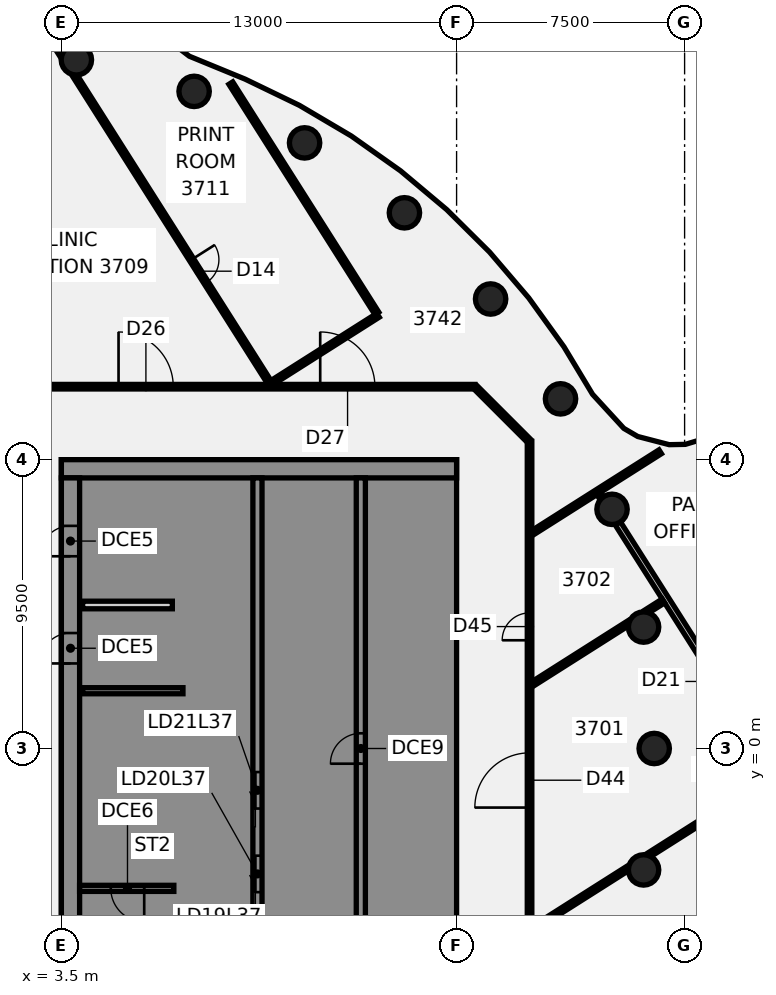
"""IFC4 building model, lengths in metres.
Left out: names, types, materials, properties, quantities, classifications, styles, units other than length and angle.
Written with IfcOpenShell. Run it as: python <this file> out.ifc"""

import sys

from ifc_helpers import new_model, si_unit, direction, frame, frame_2d, origin, origin_2d, place, context, subcontext, project, spatial, polyline, rectangle, circle, outline, extrude, element, fill, save


model = new_model("IFC4")
c1 = context("Model", 3, precision=1e-05, world=origin(), true_north=direction((0.0, 1.0)))
c2 = subcontext(c1, "Body", "Model", "MODEL_VIEW")
j1 = project(units=[si_unit("LENGTHUNIT", "METRE"), si_unit("PLANEANGLEUNIT", "RADIAN")], contexts=[c1])
p1 = place(None, origin())
s1 = spatial("IfcSite", under=j1, at=p1, CompositionType="ELEMENT")
p2 = place(p1, origin())
s2 = spatial("IfcBuilding", under=s1, at=p2, CompositionType="ELEMENT")
p3 = place(p2, frame((0.0, 0.0, 151.75)))
s3 = spatial("IfcBuildingStorey", under=s2, at=p3, CompositionType="ELEMENT", Elevation=151.75)
for number, where, z_axis, x_axis in (
    (1, (23.0, 0.0, -0.14), (0.0, 0.0, 1.0), (1.0, 0.0, 0.0)),
    (2, (22.651, 3.994, -0.14), (0.0, 0.0, 1.0), (1.0, 0.0, 0.0)),
    (3, (21.613, 7.866, -0.14), (0.0, 0.0, 1.0), (1.0, 0.0, 0.0)),
    (4, (19.919, 11.5, -0.14), (0.0, 0.0, 1.0), (1.0, 0.0, 0.0)),
    (5, (17.619, 14.784, -0.14), (0.0, 0.0, 1.0), (1.0, 0.0, 0.0)),
    (6, (14.784, 17.619, -0.14), (0.0, 0.0, 1.0), (1.0, 0.0, 0.0)),
    (7, (11.5, 19.919, -0.14), (0.0, 0.0, 1.0), (1.0, 0.0, 0.0)),
    (8, (7.866, 21.613, -0.14), (0.0, 0.0, 1.0), (1.0, 0.0, 0.0)),
    (9, (3.994, 22.651, -0.14), (0.0, 0.0, 1.0), (1.0, 0.0, 0.0)),
    (10, (22.651, -3.994, -0.14), (0.0, 0.0, 1.0), (1.0, 0.0, 0.0)),
):
    element("IfcColumn", number, at=place(p3, frame(where, z_axis=z_axis, x_axis=x_axis)), inside=s3, PredefinedType="COLUMN", context=c2, shape_type="SweptSolid", body=[
        extrude(circle(Radius=0.5, at=origin_2d()), origin(), (0.0, 0.0, 1.0), 3.75),
    ])
p4 = place(p3, frame((0.89, 26.946, 0.0), z_axis=(0.0, 0.0, 1.0), x_axis=(0.535621508911, -0.844458169001, 0.0)))
e11 = element("IfcWall", 11, at=p4, inside=s3, PredefinedType="PARTITIONING", context=c2, shape_type="SweptSolid", body=[
    extrude(rectangle(XDim=4.916, YDim=0.15, at=frame_2d((2.458, 0.0))), origin(), (0.0, 0.0, 1.0), 3.01),
])
p5 = place(p3, frame((3.926, 22.159, 0.0), z_axis=(0.0, 0.0, 1.0), x_axis=(0.53563370317, -0.844450434323, 0.0)))
e12 = element("IfcWall", 12, at=p5, inside=s3, PredefinedType="PARTITIONING", context=c2, shape_type="SweptSolid", body=[
    extrude(rectangle(XDim=11.951, YDim=0.15, at=frame_2d((5.976, 0.0))), origin(), (0.0, 0.0, 1.0), 3.01),
])
p6 = place(p5, frame((7.2, 0.0, 0.0)))
e13 = element("IfcOpeningElement", 13, at=p6, cuts=e12, PredefinedType="OPENING", context=c2, shape_type="SweptSolid", body=[
    extrude(rectangle(XDim=0.9, YDim=2.1, at=frame_2d((0.45, 1.05))), frame((0.0, 0.085, 0.0), z_axis=(0.0, -1.0, 0.0), x_axis=(1.0, 0.0, 0.0)), (0.0, 0.0, 1.0), 0.17),
])
p7 = place(p3, frame((9.073, 21.885, 0.0), z_axis=(0.0, 0.0, 1.0), x_axis=(0.535664679525, -0.844430785268, 0.0)))
e14 = element("IfcWall", 14, at=p7, inside=s3, PredefinedType="PARTITIONING", context=c2, shape_type="SweptSolid", body=[
    extrude(rectangle(XDim=8.967, YDim=0.15, at=frame_2d((4.484, 0.0))), origin(), (0.0, 0.0, 1.0), 3.01),
])
p8 = place(p3, frame((21.178, 8.39, 0.0), z_axis=(0.0, 0.0, 1.0), x_axis=(0.535205480582, -0.844721903087, 0.0)))
e15 = element("IfcWall", 15, at=p8, inside=s3, PredefinedType="PARTITIONING", context=c2, shape_type="SweptSolid", body=[
    extrude(rectangle(XDim=0.189, YDim=0.15, at=frame_2d((0.095, 0.0))), origin(), (0.0, 0.0, 1.0), 3.01),
])
p9 = place(p3, frame((21.802, 7.407, 0.0), z_axis=(0.0, 0.0, 1.0), x_axis=(0.535767031035, -0.844365849888, 0.0)))
e16 = element("IfcWall", 16, at=p9, inside=s3, PredefinedType="PARTITIONING", context=c2, shape_type="SweptSolid", body=[
    extrude(rectangle(XDim=13.06, YDim=0.2, at=frame_2d((6.53, 0.0))), origin(), (0.0, 0.0, 1.0), 3.01),
])
p10 = place(p9, frame((5.461, 0.0, 0.0)))
e17 = element("IfcOpeningElement", 17, at=p10, cuts=e16, PredefinedType="OPENING", context=c2, shape_type="SweptSolid", body=[
    extrude(rectangle(XDim=1.4, YDim=2.1, at=frame_2d((0.7, 1.05))), frame((0.0, 0.11, 0.0), z_axis=(0.0, -1.0, 0.0), x_axis=(1.0, 0.0, 0.0)), (0.0, 0.0, 1.0), 0.22),
])
p11 = place(p3, frame((17.128, 11.872, 0.0), z_axis=(0.0, 0.0, 1.0), x_axis=(0.707106781187, -0.707106781187, 0.0)))
e18 = element("IfcWall", 18, at=p11, inside=s3, PredefinedType="PARTITIONING", context=c2, shape_type="SweptSolid", body=[
    extrude(rectangle(XDim=2.465, YDim=0.15, at=frame_2d((1.232, 0.0))), origin(), (0.0, 0.0, 1.0), 3.01),
])
p12 = place(p3, frame((-17.065, 11.9, 0.0), z_axis=(0.0, 0.0, 1.0), x_axis=(1.0, 0.0, 0.0)))
e19 = element("IfcWall", 19, at=p12, inside=s3, PredefinedType="PARTITIONING", context=c2, shape_type="SweptSolid", body=[
    extrude(rectangle(XDim=34.165, YDim=0.15, at=frame_2d((17.083, 0.0))), origin(), (0.0, 0.0, 1.0), 3.01),
])
p13 = place(p12, frame((22.446, 0.0, 0.0)))
e20 = element("IfcOpeningElement", 20, at=p13, cuts=e19, PredefinedType="OPENING", context=c2, shape_type="SweptSolid", body=[
    extrude(rectangle(XDim=1.8, YDim=2.1, at=frame_2d((0.9, 1.05))), frame((0.0, 0.085, 0.0), z_axis=(0.0, -1.0, 0.0), x_axis=(1.0, 0.0, 0.0)), (0.0, 0.0, 1.0), 0.17),
])
p14 = place(p12, frame((29.079, 0.0, 0.0)))
e21 = element("IfcOpeningElement", 21, at=p14, cuts=e19, PredefinedType="OPENING", context=c2, shape_type="SweptSolid", body=[
    extrude(rectangle(XDim=1.8, YDim=2.1, at=frame_2d((0.9, 1.05))), frame((0.0, 0.085, 0.0), z_axis=(0.0, -1.0, 0.0), x_axis=(1.0, 0.0, 0.0)), (0.0, 0.0, 1.0), 0.17),
])
p15 = place(p12, frame((8.445, 0.0, 0.0)))
e22 = element("IfcOpeningElement", 22, at=p15, cuts=e19, PredefinedType="OPENING", context=c2, shape_type="SweptSolid", body=[
    extrude(rectangle(XDim=1.8, YDim=2.1, at=frame_2d((0.9, 1.05))), frame((0.0, 0.085, 0.0), z_axis=(0.0, -1.0, 0.0), x_axis=(1.0, 0.0, 0.0)), (0.0, 0.0, 1.0), 0.17),
])
p16 = place(p3, frame((-7.407, 21.802, 0.0), z_axis=(0.0, 0.0, 1.0), x_axis=(0.844365849888, 0.535767031035, 0.0)))
e23 = element("IfcWall", 23, at=p16, inside=s3, PredefinedType="PARTITIONING", context=c2, shape_type="SweptSolid", body=[
    extrude(rectangle(XDim=13.06, YDim=0.2, at=frame_2d((6.53, 0.0))), origin(), (0.0, 0.0, 1.0), 3.01),
])
p17 = place(p16, frame((5.461, 0.0, 0.0)))
e24 = element("IfcOpeningElement", 24, at=p17, cuts=e23, PredefinedType="OPENING", context=c2, shape_type="SweptSolid", body=[
    extrude(rectangle(XDim=1.4, YDim=2.1, at=frame_2d((0.7, 1.05))), frame((0.0, 0.11, 0.0), z_axis=(0.0, -1.0, 0.0), x_axis=(1.0, 0.0, 0.0)), (0.0, 0.0, 1.0), 0.22),
])
p18 = place(p16, frame((8.461, 0.0, 0.0)))
e25 = element("IfcOpeningElement", 25, at=p18, cuts=e23, PredefinedType="OPENING", context=c2, shape_type="SweptSolid", body=[
    extrude(rectangle(XDim=0.9, YDim=2.1, at=frame_2d((0.45, 1.05))), frame((0.0, 0.11, 0.0), z_axis=(0.0, -1.0, 0.0), x_axis=(1.0, 0.0, 0.0)), (0.0, 0.0, 1.0), 0.22),
])
p19 = place(p3, frame((10.404, 12.021, 0.0), z_axis=(0.0, 0.0, 1.0), x_axis=(0.844421821782, 0.535678809454, 0.0)))
e26 = element("IfcWall", 26, at=p19, inside=s3, PredefinedType="PARTITIONING", context=c2, shape_type="SweptSolid", body=[
    extrude(rectangle(XDim=4.16, YDim=0.15, at=frame_2d((2.08, 0.0))), origin(), (0.0, 0.0, 1.0), 3.01),
])
p20 = place(p3, frame((18.997, -5.931, 0.0), z_axis=(0.0, 0.0, 1.0), x_axis=(0.844425849741, 0.535672459894, 0.0)))
e27 = element("IfcWall", 27, at=p20, inside=s3, PredefinedType="PARTITIONING", context=c2, shape_type="SweptSolid", body=[
    extrude(rectangle(XDim=3.744, YDim=0.15, at=frame_2d((1.872, 0.0))), origin(), (0.0, 0.0, 1.0), 3.01),
])
p21 = place(p3, frame((22.795, -3.522, 0.0), z_axis=(0.0, 0.0, 1.0), x_axis=(0.844458169001, 0.535621508911, 0.0)))
e28 = element("IfcWall", 28, at=p21, inside=s3, PredefinedType="PARTITIONING", context=c2, shape_type="SweptSolid", body=[
    extrude(rectangle(XDim=4.916, YDim=0.15, at=frame_2d((2.458, 0.0))), origin(), (0.0, 0.0, 1.0), 3.01),
])
p22 = place(p21, frame((2.7, 0.0, 0.0)))
e29 = element("IfcOpeningElement", 29, at=p22, cuts=e28, PredefinedType="OPENING", context=c2, shape_type="SweptSolid", body=[
    extrude(rectangle(XDim=0.9, YDim=2.1, at=frame_2d((0.45, 1.05))), frame((0.0, 0.085, 0.0), z_axis=(0.0, -1.0, 0.0), x_axis=(1.0, 0.0, 0.0)), (0.0, 0.0, 1.0), 0.17),
])
p23 = place(p3, frame((18.997, 2.122, 0.0), z_axis=(0.0, 0.0, 1.0), x_axis=(0.844431403995, 0.535663704153, 0.0)))
e30 = element("IfcWall", 30, at=p23, inside=s3, PredefinedType="PARTITIONING", context=c2, shape_type="SweptSolid", body=[
    extrude(rectangle(XDim=3.769, YDim=0.15, at=frame_2d((1.885, 0.0))), origin(), (0.0, 0.0, 1.0), 3.01),
])
p24 = place(p3, frame((22.722, 4.485, 0.0), z_axis=(0.0, 0.0, 1.0), x_axis=(0.844332505382, 0.535819578174, 0.0)))
e31 = element("IfcWall", 31, at=p24, inside=s3, PredefinedType="PARTITIONING", context=c2, shape_type="SweptSolid", body=[
    extrude(rectangle(XDim=0.688, YDim=0.15, at=frame_2d((0.344, 0.0))), origin(), (0.0, 0.0, 1.0), 3.01),
])
p25 = place(p3, frame((18.997, 7.096, 0.0), z_axis=(0.0, 0.0, 1.0), x_axis=(0.844555681742, 0.535467739866, 0.0)))
e32 = element("IfcWall", 32, at=p25, inside=s3, PredefinedType="PARTITIONING", context=c2, shape_type="SweptSolid", body=[
    extrude(rectangle(XDim=4.974, YDim=0.15, at=frame_2d((2.487, 0.0))), origin(), (0.0, 0.0, 1.0), 3.01),
])
p26 = place(p3, frame((18.9, -10.1, 0.0), z_axis=(0.0, 0.0, 1.0), x_axis=(0.0, 1.0, 0.0)))
e33 = element("IfcWall", 33, at=p26, inside=s3, PredefinedType="PARTITIONING", context=c2, shape_type="SweptSolid", body=[
    extrude(rectangle(XDim=20.2, YDim=0.15, at=frame_2d((10.1, 0.0))), origin(), (0.0, 0.0, 1.0), 3.01),
])
p27 = place(p26, frame((8.157, 0.0, 0.0)))
e34 = element("IfcOpeningElement", 34, at=p27, cuts=e33, PredefinedType="OPENING", context=c2, shape_type="SweptSolid", body=[
    extrude(rectangle(XDim=1.8, YDim=2.1, at=frame_2d((0.9, 1.05))), frame((0.0, 0.085, 0.0), z_axis=(0.0, -1.0, 0.0), x_axis=(1.0, 0.0, 0.0)), (0.0, 0.0, 1.0), 0.17),
])
p28 = place(p26, frame((13.66, 0.0, 0.0)))
e35 = element("IfcOpeningElement", 35, at=p28, cuts=e33, PredefinedType="OPENING", context=c2, shape_type="SweptSolid", body=[
    extrude(rectangle(XDim=0.9, YDim=2.1, at=frame_2d((0.45, 1.05))), frame((0.0, 0.085, 0.0), z_axis=(0.0, -1.0, 0.0), x_axis=(1.0, 0.0, 0.0)), (0.0, 0.0, 1.0), 0.17),
])
p29 = place(p3, origin())
e36 = element("IfcWall", 36, at=p29, inside=s3, PredefinedType="SHEAR", context=c2, shape_type="SweptSolid", body=[
    extrude(outline(polyline([(13.5, -8.125), (13.5, -8.9), (15.9, -8.9), (16.5, -8.9), (16.5, 8.9), (15.9, 8.9), (13.5, 8.9), (13.5, 8.125), (15.9, 8.125), (15.9, 5.625), (13.5, 5.625), (13.5, 5.375), (15.9, 5.375), (15.9, -5.375), (13.5, -5.375), (13.5, -5.625), (15.9, -5.625), (15.9, -8.125), (13.5, -8.125)])), origin(), (0.0, 0.0, 1.0), 3.61),
])
p30 = place(p3, frame((16.5, 9.2, 0.0), z_axis=(0.0, 0.0, 1.0), x_axis=(-1.0, 0.0, 0.0)))
e37 = element("IfcWall", 37, at=p30, inside=s3, PredefinedType="SHEAR", context=c2, shape_type="SweptSolid", body=[
    extrude(rectangle(XDim=13.0, YDim=0.6, at=frame_2d((6.5, 0.0))), origin(), (0.0, 0.0, 1.0), 3.61),
])
p31 = place(p3, origin())
e38 = element("IfcWall", 38, at=p31, inside=s3, PredefinedType="SHEAR", context=c2, shape_type="SweptSolid", body=[
    extrude(outline(polyline([(9.8, -5.375), (7.5, -5.375), (7.5, -2.875), (9.8, -2.875), (9.8, -2.625), (7.5, -2.625), (7.5, -0.125), (9.8, -0.125), (9.8, 0.125), (7.5, 0.125), (7.5, 2.625), (9.8, 2.625), (9.8, 2.875), (7.5, 2.875), (7.5, 5.375), (9.8, 5.375), (9.8, 5.625), (7.5, 5.625), (7.5, 8.125), (9.8, 8.125), (9.8, 8.9), (7.5, 8.9), (7.2, 8.9), (7.2, -5.625), (7.5, -5.625), (9.8, -5.625), (9.8, -5.375)])), origin(), (0.0, 0.0, 1.0), 3.61),
])
p32 = place(p3, frame((7.5, 1.9, 0.0), z_axis=(0.0, 0.0, 1.0), x_axis=(-1.0, 0.0, 0.0)))
e39 = element("IfcWall", 39, at=p32, inside=s3, PredefinedType="SHEAR", context=c2, shape_type="SweptSolid", body=[
    extrude(rectangle(XDim=3.3, YDim=0.2, at=frame_2d((1.65, 0.0))), origin(), (0.0, 0.0, 1.0), 3.61),
])
p33 = place(p3, frame((13.35, -8.9, 0.0), z_axis=(0.0, 0.0, 1.0), x_axis=(0.0, 1.0, 0.0)))
e40 = element("IfcWall", 40, at=p33, inside=s3, PredefinedType="SHEAR", context=c2, shape_type="SweptSolid", body=[
    extrude(rectangle(XDim=17.8, YDim=0.3, at=frame_2d((8.9, 0.0))), origin(), (0.0, 0.0, 1.0), 3.61),
])
p34 = place(p33, frame((1.325, 0.0, 0.0)))
e41 = element("IfcOpeningElement", 41, at=p34, cuts=e40, PredefinedType="OPENING", context=c2, shape_type="SweptSolid", body=[
    extrude(rectangle(XDim=1.4, YDim=2.1, at=frame_2d((0.7, 1.05))), frame((0.0, 0.16, 0.0), z_axis=(0.0, -1.0, 0.0), x_axis=(1.0, 0.0, 0.0)), (0.0, 0.0, 1.0), 0.32),
])
p35 = place(p33, frame((8.4, 0.0, 0.0)))
e42 = element("IfcOpeningElement", 42, at=p35, cuts=e40, PredefinedType="OPENING", context=c2, shape_type="SweptSolid", body=[
    extrude(rectangle(XDim=1.0, YDim=2.1, at=frame_2d((0.5, 1.05))), frame((0.0, 0.16, 0.0), z_axis=(0.0, -1.0, 0.0), x_axis=(1.0, 0.0, 0.0)), (0.0, 0.0, 1.0), 0.32),
])
p36 = place(p3, frame((9.95, -8.9, 0.0), z_axis=(0.0, 0.0, 1.0), x_axis=(0.0, 1.0, 0.0)))
e43 = element("IfcWall", 43, at=p36, inside=s3, PredefinedType="SHEAR", context=c2, shape_type="SweptSolid", body=[
    extrude(rectangle(XDim=17.8, YDim=0.3, at=frame_2d((8.9, 0.0))), origin(), (0.0, 0.0, 1.0), 3.61),
])
p37 = place(p36, frame((4.175, 0.0, 0.0)))
e44 = element("IfcOpeningElement", 44, at=p37, cuts=e43, PredefinedType="OPENING", context=c2, shape_type="SweptSolid", body=[
    extrude(rectangle(XDim=1.2, YDim=2.1, at=frame_2d((0.6, 1.05))), frame((0.0, 0.16, 0.0), z_axis=(0.0, -1.0, 0.0), x_axis=(1.0, 0.0, 0.0)), (0.0, 0.0, 1.0), 0.32),
])
p38 = place(p36, frame((6.925, 0.0, 0.0)))
e45 = element("IfcOpeningElement", 45, at=p38, cuts=e43, PredefinedType="OPENING", context=c2, shape_type="SweptSolid", body=[
    extrude(rectangle(XDim=1.2, YDim=2.1, at=frame_2d((0.6, 1.05))), frame((0.0, 0.16, 0.0), z_axis=(0.0, -1.0, 0.0), x_axis=(1.0, 0.0, 0.0)), (0.0, 0.0, 1.0), 0.32),
])
p39 = place(p3, frame((3.8, -8.9, 0.0), z_axis=(0.0, 0.0, 1.0), x_axis=(0.0, 1.0, 0.0)))
e46 = element("IfcWall", 46, at=p39, inside=s3, PredefinedType="SHEAR", context=c2, shape_type="SweptSolid", body=[
    extrude(rectangle(XDim=17.8, YDim=0.6, at=frame_2d((8.9, 0.0))), origin(), (0.0, 0.0, 1.0), 3.61),
])
p40 = place(p39, frame((1.25, 0.0, 0.0)))
e47 = element("IfcOpeningElement", 47, at=p40, cuts=e46, PredefinedType="OPENING", context=c2, shape_type="SweptSolid", body=[
    extrude(rectangle(XDim=1.8, YDim=2.1, at=frame_2d((0.9, 1.05))), frame((0.0, 0.31, 0.0), z_axis=(0.0, -1.0, 0.0), x_axis=(1.0, 0.0, 0.0)), (0.0, 0.0, 1.0), 0.62),
])
p41 = place(p39, frame((11.698, 0.0, 0.0)))
e48 = element("IfcOpeningElement", 48, at=p41, cuts=e46, PredefinedType="OPENING", context=c2, shape_type="SweptSolid", body=[
    extrude(rectangle(XDim=1.0, YDim=2.1, at=frame_2d((0.5, 1.05))), frame((0.0, 0.31, 0.0), z_axis=(0.0, -1.0, 0.0), x_axis=(1.0, 0.0, 0.0)), (0.0, 0.0, 1.0), 0.62),
])
p42 = place(p39, frame((15.222, 0.0, 0.0)))
e49 = element("IfcOpeningElement", 49, at=p42, cuts=e46, PredefinedType="OPENING", context=c2, shape_type="SweptSolid", body=[
    extrude(rectangle(XDim=1.0, YDim=2.1, at=frame_2d((0.5, 1.05))), frame((0.0, 0.31, 0.0), z_axis=(0.0, -1.0, 0.0), x_axis=(1.0, 0.0, 0.0)), (0.0, 0.0, 1.0), 0.62),
])
p43 = place(p3, frame((7.15, 4.72, 0.0), z_axis=(0.0, 0.0, 1.0), x_axis=(-1.0, 0.0, 0.0)))
e50 = element("IfcWall", 50, at=p43, inside=s3, PredefinedType="PARTITIONING", context=c2, shape_type="SweptSolid", body=[
    extrude(rectangle(XDim=2.95, YDim=0.25, at=frame_2d((1.475, 0.0))), origin(), (0.0, 0.0, 1.0), 3.61),
])
p44 = place(p3, frame((7.2, -4.6, 0.0), z_axis=(0.0, 0.0, 1.0), x_axis=(-1.0, 0.0, 0.0)))
e51 = element("IfcWall", 51, at=p44, inside=s3, PredefinedType="SHEAR", context=c2, shape_type="SweptSolid", body=[
    extrude(rectangle(XDim=3.1, YDim=0.2, at=frame_2d((1.55, 0.0))), origin(), (0.0, 0.0, 1.0), 3.61),
])
p45 = place(p44, frame((0.975, 0.0, 0.0)))
e52 = element("IfcOpeningElement", 52, at=p45, cuts=e51, PredefinedType="OPENING", context=c2, shape_type="SweptSolid", body=[
    extrude(rectangle(XDim=1.1, YDim=2.1, at=frame_2d((0.55, 1.05))), frame((0.0, 0.11, 0.0), z_axis=(0.0, -1.0, 0.0), x_axis=(1.0, 0.0, 0.0)), (0.0, 0.0, 1.0), 0.22),
])
p46 = place(p6, origin())
e53 = element("IfcDoor", 53, at=p46, inside=s3, OperationType="SINGLE_SWING_LEFT", PredefinedType="DOOR", context=c2, shape_type="SweptSolid", body=[
    extrude(rectangle(XDim=0.9, YDim=2.1, at=frame_2d((0.45, 1.05))), frame((0.0, 0.025, 0.0), z_axis=(0.0, -1.0, 0.0), x_axis=(1.0, 0.0, 0.0)), (0.0, 0.0, 1.0), 0.05),
])
fill(e13, e53)
p47 = place(p13, frame((1.8, 0.0, 0.0), z_axis=(0.0, 0.0, 1.0), x_axis=(-1.0, 0.0, 0.0)))
e54 = element("IfcDoor", 54, at=p47, inside=s3, OperationType="DOUBLE_DOOR_SINGLE_SWING", PredefinedType="DOOR", context=c2, shape_type="SweptSolid", body=[
    extrude(rectangle(XDim=1.8, YDim=2.1, at=frame_2d((0.9, 1.05))), frame((0.0, 0.025, 0.0), z_axis=(0.0, -1.0, 0.0), x_axis=(1.0, 0.0, 0.0)), (0.0, 0.0, 1.0), 0.05),
])
fill(e20, e54)
p48 = place(p14, origin())
e55 = element("IfcDoor", 55, at=p48, inside=s3, OperationType="DOUBLE_DOOR_SINGLE_SWING", PredefinedType="DOOR", context=c2, shape_type="SweptSolid", body=[
    extrude(rectangle(XDim=1.8, YDim=2.1, at=frame_2d((0.9, 1.05))), frame((0.0, 0.025, 0.0), z_axis=(0.0, -1.0, 0.0), x_axis=(1.0, 0.0, 0.0)), (0.0, 0.0, 1.0), 0.05),
])
fill(e21, e55)
p49 = place(p27, origin())
e56 = element("IfcDoor", 56, at=p49, inside=s3, OperationType="DOUBLE_DOOR_SINGLE_SWING", PredefinedType="DOOR", context=c2, shape_type="SweptSolid", body=[
    extrude(rectangle(XDim=1.8, YDim=2.1, at=frame_2d((0.9, 1.05))), frame((0.0, 0.025, 0.0), z_axis=(0.0, -1.0, 0.0), x_axis=(1.0, 0.0, 0.0)), (0.0, 0.0, 1.0), 0.05),
])
fill(e34, e56)
p50 = place(p28, frame((0.9, 0.0, 0.0), z_axis=(0.0, 0.0, 1.0), x_axis=(-1.0, 0.0, 0.0)))
e57 = element("IfcDoor", 57, at=p50, inside=s3, OperationType="SINGLE_SWING_RIGHT", PredefinedType="DOOR", context=c2, shape_type="SweptSolid", body=[
    extrude(rectangle(XDim=0.9, YDim=2.1, at=frame_2d((0.45, 1.05))), frame((0.0, 0.025, 0.0), z_axis=(0.0, -1.0, 0.0), x_axis=(1.0, 0.0, 0.0)), (0.0, 0.0, 1.0), 0.05),
])
fill(e35, e57)
p51 = place(p41, origin())
e58 = element("IfcDoor", 58, at=p51, inside=s3, OperationType="SINGLE_SWING_LEFT", PredefinedType="DOOR", context=c2, shape_type="SweptSolid", body=[
    extrude(rectangle(XDim=1.0, YDim=2.1, at=frame_2d((0.5, 1.05))), frame((0.0, -0.225, 0.0), z_axis=(0.0, -1.0, 0.0), x_axis=(1.0, 0.0, 0.0)), (0.0, 0.0, 1.0), 0.05),
])
fill(e48, e58)
p52 = place(p42, origin())
e59 = element("IfcDoor", 59, at=p52, inside=s3, OperationType="SINGLE_SWING_LEFT", PredefinedType="DOOR", context=c2, shape_type="SweptSolid", body=[
    extrude(rectangle(XDim=1.0, YDim=2.1, at=frame_2d((0.5, 1.05))), frame((0.0, -0.225, 0.0), z_axis=(0.0, -1.0, 0.0), x_axis=(1.0, 0.0, 0.0)), (0.0, 0.0, 1.0), 0.05),
])
fill(e49, e59)
p53 = place(p45, origin())
e60 = element("IfcDoor", 60, at=p53, inside=s3, OperationType="SINGLE_SWING_LEFT", PredefinedType="DOOR", context=c2, shape_type="SweptSolid", body=[
    extrude(rectangle(XDim=1.1, YDim=2.1, at=frame_2d((0.55, 1.05))), frame((0.0, 0.025, 0.0), z_axis=(0.0, -1.0, 0.0), x_axis=(1.0, 0.0, 0.0)), (0.0, 0.0, 1.0), 0.05),
])
fill(e52, e60)
p54 = place(p37, origin())
e61 = element("IfcDoor", 61, at=p54, inside=s3, OperationType="SLIDING_TO_LEFT", PredefinedType="DOOR", context=c2, shape_type="SweptSolid", body=[
    extrude(rectangle(XDim=1.2, YDim=2.1, at=frame_2d((0.6, 1.05))), frame((0.0, 0.025, 0.0), z_axis=(0.0, -1.0, 0.0), x_axis=(1.0, 0.0, 0.0)), (0.0, 0.0, 1.0), 0.05),
])
fill(e44, e61)
p55 = place(p38, origin())
e62 = element("IfcDoor", 62, at=p55, inside=s3, OperationType="SLIDING_TO_LEFT", PredefinedType="DOOR", context=c2, shape_type="SweptSolid", body=[
    extrude(rectangle(XDim=1.2, YDim=2.1, at=frame_2d((0.6, 1.05))), frame((0.0, 0.025, 0.0), z_axis=(0.0, -1.0, 0.0), x_axis=(1.0, 0.0, 0.0)), (0.0, 0.0, 1.0), 0.05),
])
fill(e45, e62)
p56 = place(p35, origin())
e63 = element("IfcDoor", 63, at=p56, inside=s3, OperationType="SINGLE_SWING_LEFT", PredefinedType="DOOR", context=c2, shape_type="SweptSolid", body=[
    extrude(rectangle(XDim=1.0, YDim=2.1, at=frame_2d((0.5, 1.05))), frame((0.0, 0.025, 0.0), z_axis=(0.0, -1.0, 0.0), x_axis=(1.0, 0.0, 0.0)), (0.0, 0.0, 1.0), 0.05),
])
fill(e42, e63)
save(model, sys.argv[1])
